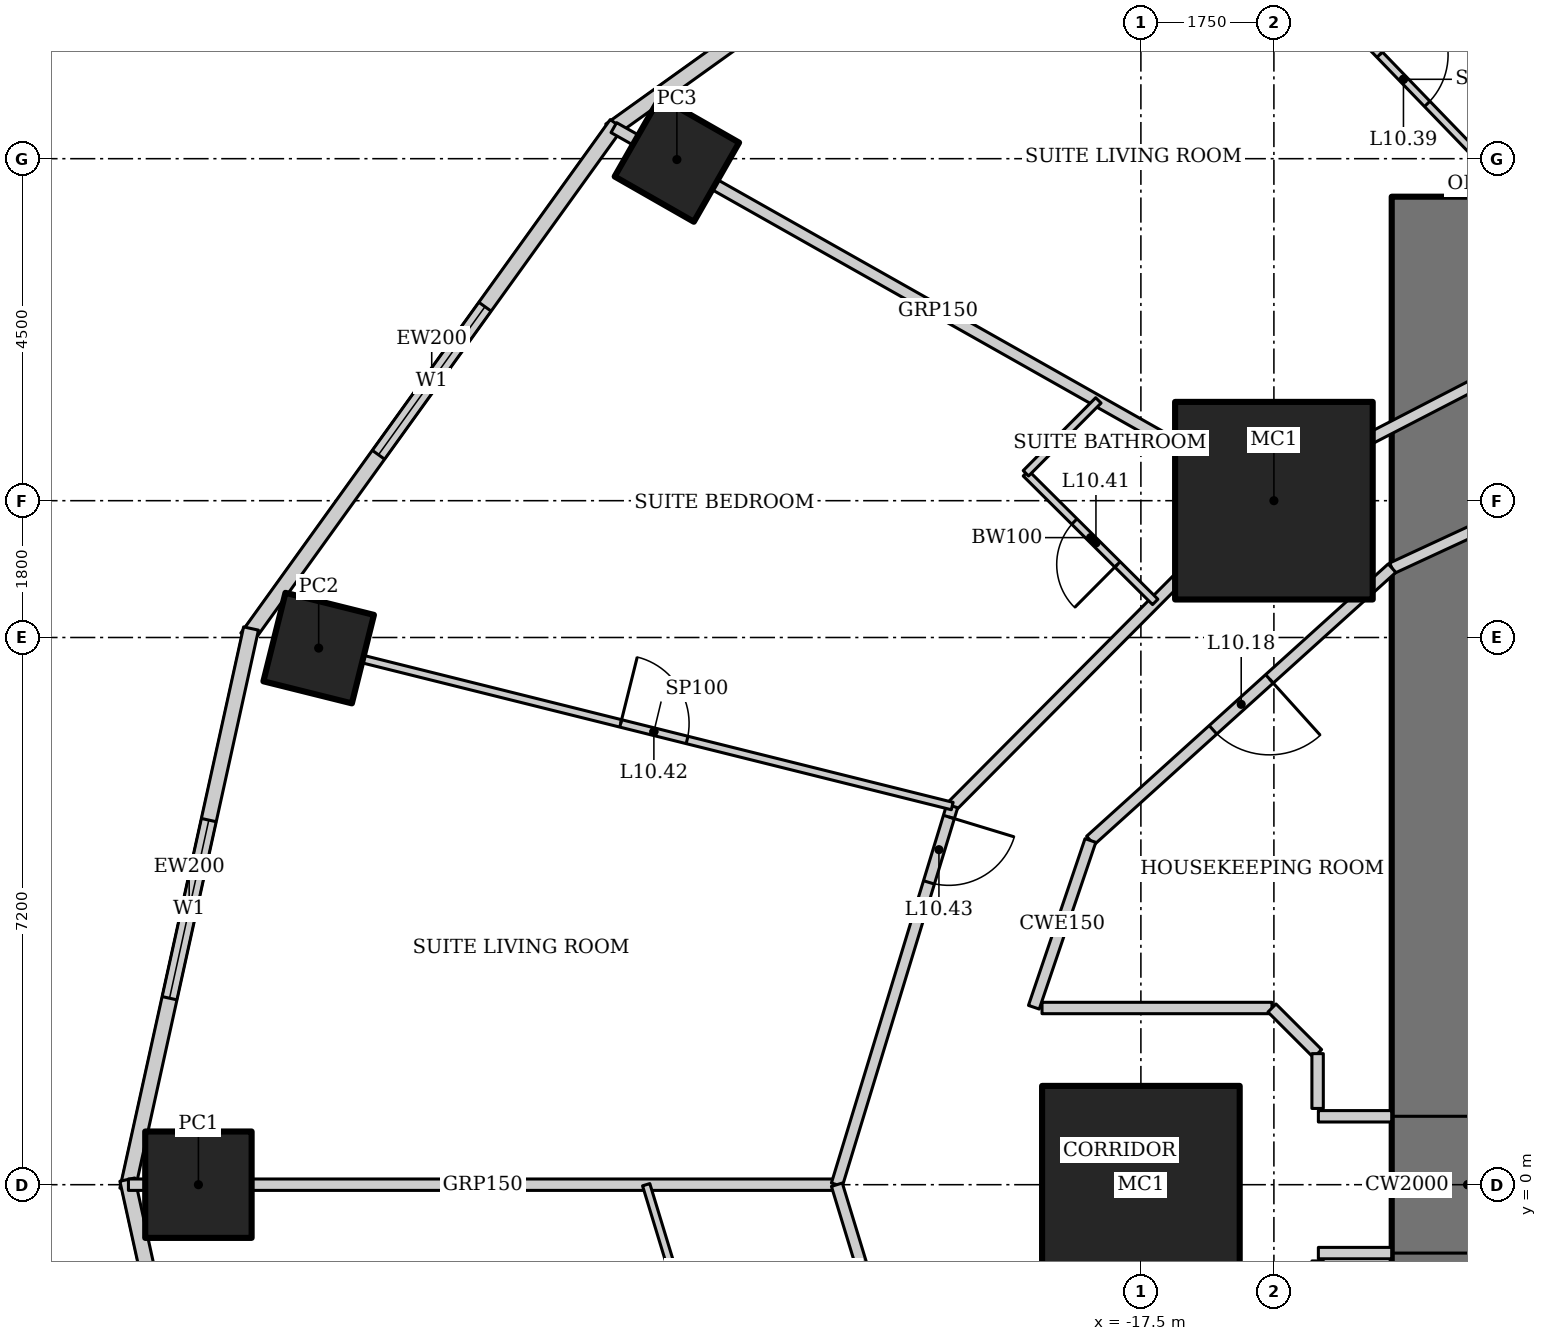
"""IFC4 building model, lengths in metres.
Left out: names, types, materials, properties, quantities, classifications, styles, units other than length and angle.
Written with IfcOpenShell. Run it as: python <this file> out.ifc"""

import sys

from ifc_helpers import new_model, si_unit, direction, frame, frame_2d, origin, origin_2d, place, context, subcontext, project, spatial, rectangle, hollow_rectangle, extrude, element, fill, save


model = new_model("IFC4")
c1 = context("Model", 3, precision=1e-05, world=origin(), true_north=direction((0.0, 1.0)))
c2 = subcontext(c1, "Body", "Model", "MODEL_VIEW")
j1 = project(units=[si_unit("LENGTHUNIT", "METRE"), si_unit("PLANEANGLEUNIT", "RADIAN")], contexts=[c1])
p1 = place(None, origin())
s1 = spatial("IfcSite", under=j1, at=p1, CompositionType="ELEMENT")
p2 = place(p1, origin())
s2 = spatial("IfcBuilding", under=s1, at=p2, CompositionType="ELEMENT")
p3 = place(p2, frame((0.0, 0.0, 51.4)))
s3 = spatial("IfcBuildingStorey", under=s2, at=p3, CompositionType="ELEMENT", Elevation=51.4)
for number, where, z_axis, x_axis in (
    (1, (-15.75, 9.0, 0.0), (0.0, 0.0, 1.0), (1.0, 0.0, 0.0)),
    (2, (-17.5, 0.0, 0.0), (0.0, 0.0, 1.0), (1.0, 0.0, 0.0)),
):
    element("IfcColumn", number, at=place(p3, frame(where, z_axis=z_axis, x_axis=x_axis)), inside=s3, PredefinedType="COLUMN", context=c2, shape_type="SweptSolid", body=[
        extrude(hollow_rectangle(XDim=2.6, YDim=2.6, WallThickness=0.13, at=origin_2d()), origin(), (0.0, 0.0, 1.0), 3.6),
    ])
p4 = place(p3, frame((-23.605, 13.489, 0.0), z_axis=(0.0, 0.0, 1.0), x_axis=(0.496139221777, 0.86824298017, 0.0)))
e3 = element("IfcColumn", 3, at=p4, inside=s3, PredefinedType="COLUMN", context=c2, shape_type="SweptSolid", body=[
    extrude(hollow_rectangle(XDim=1.2, YDim=1.2, WallThickness=0.12, at=origin_2d()), origin(), (0.0, 0.0, 1.0), 3.6),
])
p5 = place(p3, frame((-28.318, 7.06, 0.0), z_axis=(0.0, 0.0, 1.0), x_axis=(0.2419218956, 0.970295726276, 0.0)))
e4 = element("IfcColumn", 4, at=p5, inside=s3, PredefinedType="COLUMN", context=c2, shape_type="SweptSolid", body=[
    extrude(hollow_rectangle(XDim=1.2, YDim=1.2, WallThickness=0.1, at=origin_2d()), origin(), (0.0, 0.0, 1.0), 3.6),
])
p6 = place(p3, frame((-29.9, 0.0, 0.0), z_axis=(0.0, 0.0, 1.0), x_axis=(1.0, 0.0, 0.0)))
e5 = element("IfcColumn", 5, at=p6, inside=s3, PredefinedType="COLUMN", context=c2, shape_type="SweptSolid", body=[
    extrude(hollow_rectangle(XDim=1.4, YDim=1.4, WallThickness=0.1, at=origin_2d()), origin(), (0.0, 0.0, 1.0), 3.6),
])
p7 = place(p3, frame((-13.2, 13.0, 0.0), z_axis=(0.0, 0.0, 1.0), x_axis=(0.0, -1.0, 0.0)))
e6 = element("IfcWall", 6, at=p7, inside=s3, PredefinedType="SHEAR", context=c2, shape_type="SweptSolid", body=[
    extrude(rectangle(XDim=26.0, YDim=2.0, at=frame_2d((13.0, 0.0))), origin(), (0.0, 0.0, 1.0), 3.6),
])
p8 = place(p7, frame((12.1, 0.0, 0.0)))
e7 = element("IfcOpeningElement", 7, at=p8, cuts=e6, PredefinedType="OPENING", context=c2, shape_type="SweptSolid", body=[
    extrude(rectangle(XDim=1.8, YDim=2.1, at=frame_2d((0.9, 1.05))), frame((0.0, 1.01, 0.0), z_axis=(0.0, -1.0, 0.0), x_axis=(1.0, 0.0, 0.0)), (0.0, 0.0, 1.0), 2.02),
])
p9 = place(p3, frame((-17.929, 18.572, 0.0), z_axis=(0.0, 0.0, 1.0), x_axis=(-0.812791321576, -0.582554948112, 0.0)))
e8 = element("IfcWall", 8, at=p9, inside=s3, PredefinedType="SOLIDWALL", context=c2, shape_type="SweptSolid", body=[
    extrude(rectangle(XDim=8.063, YDim=0.2, at=frame_2d((4.032, 0.0))), origin(), (0.0, 0.0, 1.0), 3.45),
])
p10 = place(p9, frame((2.832, 0.0, 0.5)))
e9 = element("IfcOpeningElement", 9, at=p10, cuts=e8, PredefinedType="OPENING", context=c2, shape_type="SweptSolid", body=[
    extrude(rectangle(XDim=2.4, YDim=2.2, at=frame_2d((1.2, 1.1))), frame((0.0, 0.11, 0.0), z_axis=(0.0, -1.0, 0.0), x_axis=(1.0, 0.0, 0.0)), (0.0, 0.0, 1.0), 0.22),
])
p11 = place(p3, frame((-24.4, 13.957, 0.0), z_axis=(0.0, 0.0, 1.0), x_axis=(-0.583937613703, -0.811798536155, 0.0)))
e10 = element("IfcWall", 10, at=p11, inside=s3, PredefinedType="SOLIDWALL", context=c2, shape_type="SweptSolid", body=[
    extrude(rectangle(XDim=8.323, YDim=0.2, at=frame_2d((4.162, 0.0))), origin(), (0.0, 0.0, 1.0), 3.45),
])
p12 = place(p11, frame((2.961, 0.0, 0.5)))
e11 = element("IfcOpeningElement", 11, at=p12, cuts=e10, PredefinedType="OPENING", context=c2, shape_type="SweptSolid", body=[
    extrude(rectangle(XDim=2.4, YDim=2.2, at=frame_2d((1.2, 1.1))), frame((0.0, 0.11, 0.0), z_axis=(0.0, -1.0, 0.0), x_axis=(1.0, 0.0, 0.0)), (0.0, 0.0, 1.0), 0.22),
])
p13 = place(p3, frame((-29.208, 7.318, 0.0), z_axis=(0.0, 0.0, 1.0), x_axis=(-0.215238065514, -0.976561608478, 0.0)))
e12 = element("IfcWall", 12, at=p13, inside=s3, PredefinedType="SOLIDWALL", context=c2, shape_type="SweptSolid", body=[
    extrude(rectangle(XDim=7.562, YDim=0.2, at=frame_2d((3.781, 0.0))), origin(), (0.0, 0.0, 1.0), 3.45),
])
p14 = place(p13, frame((2.581, 0.0, 0.5)))
e13 = element("IfcOpeningElement", 13, at=p14, cuts=e12, PredefinedType="OPENING", context=c2, shape_type="SweptSolid", body=[
    extrude(rectangle(XDim=2.4, YDim=2.2, at=frame_2d((1.2, 1.1))), frame((0.0, 0.11, 0.0), z_axis=(0.0, -1.0, 0.0), x_axis=(1.0, 0.0, 0.0)), (0.0, 0.0, 1.0), 0.22),
])
p15 = place(p3, frame((-30.835, 0.067, 0.0), z_axis=(0.0, 0.0, 1.0), x_axis=(0.215238065514, -0.976561608478, 0.0)))
e14 = element("IfcWall", 14, at=p15, inside=s3, PredefinedType="SOLIDWALL", context=c2, shape_type="SweptSolid", body=[
    extrude(rectangle(XDim=7.562, YDim=0.2, at=frame_2d((3.781, 0.0))), origin(), (0.0, 0.0, 1.0), 3.45),
])
p16 = place(p15, frame((2.581, 0.0, 0.5)))
e15 = element("IfcOpeningElement", 15, at=p16, cuts=e14, PredefinedType="OPENING", context=c2, shape_type="SweptSolid", body=[
    extrude(rectangle(XDim=2.4, YDim=2.2, at=frame_2d((1.2, 1.1))), frame((0.0, 0.11, 0.0), z_axis=(0.0, -1.0, 0.0), x_axis=(1.0, 0.0, 0.0)), (0.0, 0.0, 1.0), 0.22),
])
p17 = place(p3, frame((-24.435, 13.909, 0.0), z_axis=(0.0, 0.0, 1.0), x_axis=(0.870612006791, -0.491970256856, 0.0)))
e16 = element("IfcWall", 16, at=p17, inside=s3, PredefinedType="PARTITIONING", context=c2, shape_type="SweptSolid", body=[
    extrude(rectangle(XDim=9.802, YDim=0.15, at=frame_2d((4.901, 0.0))), origin(), (0.0, 0.0, 1.0), 2.693),
])
p18 = place(p3, frame((-30.821, 0.0, 0.0), z_axis=(0.0, 0.0, 1.0), x_axis=(1.0, 0.0, 0.0)))
e17 = element("IfcWall", 17, at=p18, inside=s3, PredefinedType="PARTITIONING", context=c2, shape_type="SweptSolid", body=[
    extrude(rectangle(XDim=9.321, YDim=0.15, at=frame_2d((4.66, 0.0))), origin(), (0.0, 0.0, 1.0), 2.528),
])
p19 = place(p3, frame((-11.147, 11.544, 0.0), z_axis=(0.0, 0.0, 1.0), x_axis=(-0.888333171507, -0.459199495209, 0.0)))
e18 = element("IfcWall", 18, at=p19, inside=s3, PredefinedType="PARTITIONING", context=c2, shape_type="SweptSolid", body=[
    extrude(rectangle(XDim=5.351, YDim=0.15, at=frame_2d((2.676, 0.0))), origin(), (0.0, 0.0, 1.0), 3.45),
])
p20 = place(p19, frame((0.15, 0.0, 0.0)))
e19 = element("IfcOpeningElement", 19, at=p20, cuts=e18, PredefinedType="OPENING", context=c2, shape_type="SweptSolid", body=[
    extrude(rectangle(XDim=0.9, YDim=2.1, at=frame_2d((0.45, 1.05))), frame((0.0, 0.085, 0.0), z_axis=(0.0, -1.0, 0.0), x_axis=(1.0, 0.0, 0.0)), (0.0, 0.0, 1.0), 0.17),
])
p21 = place(p3, frame((-15.901, 9.086, 0.0), z_axis=(0.0, 0.0, 1.0), x_axis=(-0.705121546414, -0.709086457904, 0.0)))
e20 = element("IfcWall", 20, at=p21, inside=s3, PredefinedType="PARTITIONING", context=c2, shape_type="SweptSolid", body=[
    extrude(rectangle(XDim=5.788, YDim=0.15, at=frame_2d((2.894, 0.0))), origin(), (0.0, 0.0, 1.0), 3.45),
])
p22 = place(p3, frame((-19.982, 4.982, 0.0), z_axis=(0.0, 0.0, 1.0), x_axis=(-0.291383581394, -0.95660629754, 0.0)))
e21 = element("IfcWall", 21, at=p22, inside=s3, PredefinedType="PARTITIONING", context=c2, shape_type="SweptSolid", body=[
    extrude(rectangle(XDim=5.208, YDim=0.15, at=frame_2d((2.604, 0.0))), origin(), (0.0, 0.0, 1.0), 3.45),
])
p23 = place(p22, frame((0.15, 0.0, 0.0)))
e22 = element("IfcOpeningElement", 22, at=p23, cuts=e21, PredefinedType="OPENING", context=c2, shape_type="SweptSolid", body=[
    extrude(rectangle(XDim=0.9, YDim=2.1, at=frame_2d((0.45, 1.05))), frame((0.0, 0.085, 0.0), z_axis=(0.0, -1.0, 0.0), x_axis=(1.0, 0.0, 0.0)), (0.0, 0.0, 1.0), 0.17),
])
p24 = place(p3, frame((-21.5, 0.0, 0.0), z_axis=(0.0, 0.0, 1.0), x_axis=(0.291383581394, -0.95660629754, 0.0)))
e23 = element("IfcWall", 23, at=p24, inside=s3, PredefinedType="PARTITIONING", context=c2, shape_type="SweptSolid", body=[
    extrude(rectangle(XDim=5.208, YDim=0.15, at=frame_2d((2.604, 0.0))), origin(), (0.0, 0.0, 1.0), 3.45),
])
p25 = place(p3, frame((-9.801, 10.149, 0.0), z_axis=(0.0, 0.0, 1.0), x_axis=(-0.907279653965, -0.420527798727, 0.0)))
e24 = element("IfcWall", 24, at=p25, inside=s3, PredefinedType="PARTITIONING", context=c2, shape_type="SweptSolid", body=[
    extrude(rectangle(XDim=4.844, YDim=0.15, at=frame_2d((2.422, 0.0))), origin(), (0.0, 0.0, 1.0), 3.45),
])
p26 = place(p3, frame((-14.196, 8.112, 0.0), z_axis=(0.0, 0.0, 1.0), x_axis=(-0.742194222, -0.670184852731, 0.0)))
e25 = element("IfcWall", 25, at=p26, inside=s3, PredefinedType="PARTITIONING", context=c2, shape_type="SweptSolid", body=[
    extrude(rectangle(XDim=5.347, YDim=0.15, at=frame_2d((2.673, 0.0))), origin(), (0.0, 0.0, 1.0), 3.45),
])
p27 = place(p26, frame((2.173, 0.0, 0.0)))
e26 = element("IfcOpeningElement", 26, at=p27, cuts=e25, PredefinedType="OPENING", context=c2, shape_type="SweptSolid", body=[
    extrude(rectangle(XDim=1.0, YDim=2.1, at=frame_2d((0.5, 1.05))), frame((0.0, 0.085, 0.0), z_axis=(0.0, -1.0, 0.0), x_axis=(1.0, 0.0, 0.0)), (0.0, 0.0, 1.0), 0.17),
])
p28 = place(p3, frame((-16.944, 17.545, 0.0), z_axis=(0.0, 0.0, 1.0), x_axis=(0.694680670522, -0.71931826475, 0.0)))
e27 = element("IfcWall", 27, at=p28, inside=s3, PredefinedType="PARTITIONING", context=c2, shape_type="SweptSolid", body=[
    extrude(rectangle(XDim=8.344, YDim=0.1, at=frame_2d((4.172, 0.0))), origin(), (0.0, 0.0, 1.0), 2.528),
])
p29 = place(p28, frame((3.722, 0.0, 0.0)))
e28 = element("IfcOpeningElement", 28, at=p29, cuts=e27, PredefinedType="OPENING", context=c2, shape_type="SweptSolid", body=[
    extrude(rectangle(XDim=0.9, YDim=2.1, at=frame_2d((0.45, 1.05))), frame((0.0, 0.06, 0.0), z_axis=(0.0, -1.0, 0.0), x_axis=(1.0, 0.0, 0.0)), (0.0, 0.0, 1.0), 0.12),
])
p30 = place(p3, frame((-17.311, 7.668, 0.0), z_axis=(0.0, 0.0, 1.0), x_axis=(-0.709138392716, 0.705069315724, 0.0)))
e29 = element("IfcWall", 29, at=p30, inside=s3, PredefinedType="PARTITIONING", context=c2, shape_type="SweptSolid", body=[
    extrude(rectangle(XDim=2.4, YDim=0.1, at=frame_2d((1.2, 0.0))), origin(), (0.0, 0.0, 1.0), 3.45),
])
p31 = place(p30, frame((0.7, 0.0, 0.0)))
e30 = element("IfcOpeningElement", 30, at=p31, cuts=e29, PredefinedType="OPENING", context=c2, shape_type="SweptSolid", body=[
    extrude(rectangle(XDim=0.8, YDim=2.1, at=frame_2d((0.4, 1.05))), frame((0.0, 0.06, 0.0), z_axis=(0.0, -1.0, 0.0), x_axis=(1.0, 0.0, 0.0)), (0.0, 0.0, 1.0), 0.12),
])
p32 = place(p3, frame((-19.013, 9.36, 0.0), z_axis=(0.0, 0.0, 1.0), x_axis=(0.7051187611, 0.709089227633, 0.0)))
e31 = element("IfcWall", 31, at=p32, inside=s3, PredefinedType="PARTITIONING", context=c2, shape_type="SweptSolid", body=[
    extrude(rectangle(XDim=1.353, YDim=0.1, at=frame_2d((0.676, 0.0))), origin(), (0.0, 0.0, 1.0), 3.45),
])
p33 = place(p3, frame((-27.833, 6.939, 0.0), z_axis=(0.0, 0.0, 1.0), x_axis=(0.97029673161, -0.24191786339, 0.0)))
e32 = element("IfcWall", 32, at=p33, inside=s3, PredefinedType="PARTITIONING", context=c2, shape_type="SweptSolid", body=[
    extrude(rectangle(XDim=8.091, YDim=0.1, at=frame_2d((4.045, 0.0))), origin(), (0.0, 0.0, 1.0), 2.333),
])
p34 = place(p33, frame((3.595, 0.0, 0.0)))
e33 = element("IfcOpeningElement", 33, at=p34, cuts=e32, PredefinedType="OPENING", context=c2, shape_type="SweptSolid", body=[
    extrude(rectangle(XDim=0.9, YDim=2.1, at=frame_2d((0.45, 1.05))), frame((0.0, 0.06, 0.0), z_axis=(0.0, -1.0, 0.0), x_axis=(1.0, 0.0, 0.0)), (0.0, 0.0, 1.0), 0.12),
])
p35 = place(p3, frame((-23.213, -2.613, 0.0), z_axis=(0.0, 0.0, 1.0), x_axis=(-0.291339473488, 0.956619731757, 0.0)))
e34 = element("IfcWall", 34, at=p35, inside=s3, PredefinedType="PARTITIONING", context=c2, shape_type="SweptSolid", body=[
    extrude(rectangle(XDim=2.731, YDim=0.1, at=frame_2d((1.365, 0.0))), origin(), (0.0, 0.0, 1.0), 3.45),
])
p36 = place(p3, frame((-13.2, 13.0, 0.0), z_axis=(0.0, 0.0, 1.0), x_axis=(0.719347134512, 0.69465077562, 0.0)))
e35 = element("IfcWall", 35, at=p36, inside=s3, PredefinedType="PARTITIONING", context=c2, shape_type="SweptSolid", body=[
    extrude(rectangle(XDim=0.465, YDim=0.1, at=frame_2d((0.232, 0.0))), origin(), (0.0, 0.0, 1.0), 3.45),
])
p37 = place(p3, frame((-18.164, 4.529, 0.0), z_axis=(0.0, 0.0, 1.0), x_axis=(-0.321124194945, -0.947037090837, 0.0)))
e36 = element("IfcWall", 36, at=p37, inside=s3, PredefinedType="PARTITIONING", context=c2, shape_type="SweptSolid", body=[
    extrude(rectangle(XDim=2.317, YDim=0.15, at=frame_2d((1.158, 0.0))), origin(), (0.0, 0.0, 1.0), 3.45),
])
for number, where, z_axis, x_axis in (
    (37, (-14.2, -0.9, 0.0), (0.0, 0.0, 1.0), (-1.0, 0.0, 0.0)),
    (38, (-14.2, 0.9, 0.0), (0.0, 0.0, 1.0), (-1.0, 0.0, 0.0)),
):
    element("IfcWall", number, at=place(p3, frame(where, z_axis=z_axis, x_axis=x_axis)), inside=s3, PredefinedType="PARTITIONING", context=c2, shape_type="SweptSolid", body=[
        extrude(rectangle(XDim=0.965, YDim=0.15, at=frame_2d((0.482, 0.0))), origin(), (0.0, 0.0, 1.0), 3.45),
    ])
p38 = place(p3, frame((-18.801, 2.325, 0.0), z_axis=(0.0, 0.0, 1.0), x_axis=(1.0, 0.0, 0.0)))
e39 = element("IfcWall", 39, at=p38, inside=s3, PredefinedType="PARTITIONING", context=c2, shape_type="SweptSolid", body=[
    extrude(rectangle(XDim=3.025, YDim=0.15, at=frame_2d((1.513, 0.0))), origin(), (0.0, 0.0, 1.0), 3.45),
])
p39 = place(p3, frame((-15.775, 2.325, 0.0), z_axis=(0.0, 0.0, 1.0), x_axis=(0.707106781187, -0.707106781187, 0.0)))
e40 = element("IfcWall", 40, at=p39, inside=s3, PredefinedType="PARTITIONING", context=c2, shape_type="SweptSolid", body=[
    extrude(rectangle(XDim=0.849, YDim=0.15, at=frame_2d((0.425, 0.0))), origin(), (0.0, 0.0, 1.0), 3.45),
])
p40 = place(p3, frame((-15.175, 1.725, 0.0), z_axis=(0.0, 0.0, 1.0), x_axis=(0.0, -1.0, 0.0)))
e41 = element("IfcWall", 41, at=p40, inside=s3, PredefinedType="PARTITIONING", context=c2, shape_type="SweptSolid", body=[
    extrude(rectangle(XDim=0.721, YDim=0.15, at=frame_2d((0.361, 0.0))), origin(), (0.0, 0.0, 1.0), 3.45),
])
p41 = place(p12, origin())
e42 = element("IfcWindow", 42, at=p41, inside=s3, PartitioningType="SINGLE_PANEL", PredefinedType="WINDOW", context=c2, shape_type="SweptSolid", body=[
    extrude(rectangle(XDim=2.4, YDim=2.2, at=frame_2d((1.2, 1.1))), frame((0.0, 0.03, 0.0), z_axis=(0.0, -1.0, 0.0), x_axis=(1.0, 0.0, 0.0)), (0.0, 0.0, 1.0), 0.06),
])
fill(e11, e42)
p42 = place(p14, origin())
e43 = element("IfcWindow", 43, at=p42, inside=s3, PartitioningType="SINGLE_PANEL", PredefinedType="WINDOW", context=c2, shape_type="SweptSolid", body=[
    extrude(rectangle(XDim=2.4, YDim=2.2, at=frame_2d((1.2, 1.1))), frame((0.0, 0.03, 0.0), z_axis=(0.0, -1.0, 0.0), x_axis=(1.0, 0.0, 0.0)), (0.0, 0.0, 1.0), 0.06),
])
fill(e13, e43)
p43 = place(p8, origin())
e44 = element("IfcDoor", 44, at=p43, inside=s3, OperationType="DOUBLE_DOOR_DOUBLE_SWING", PredefinedType="DOOR", context=c2, shape_type="SweptSolid", body=[
    extrude(rectangle(XDim=1.8, YDim=2.1, at=frame_2d((0.9, 1.05))), frame((0.0, 0.025, 0.0), z_axis=(0.0, -1.0, 0.0), x_axis=(1.0, 0.0, 0.0)), (0.0, 0.0, 1.0), 0.05),
])
fill(e7, e44)
p44 = place(p27, origin())
e45 = element("IfcDoor", 45, at=p44, inside=s3, OperationType="SINGLE_SWING_LEFT", PredefinedType="DOOR", context=c2, shape_type="SweptSolid", body=[
    extrude(rectangle(XDim=1.0, YDim=2.1, at=frame_2d((0.5, 1.05))), frame((0.0, 0.025, 0.0), z_axis=(0.0, -1.0, 0.0), x_axis=(1.0, 0.0, 0.0)), (0.0, 0.0, 1.0), 0.05),
])
fill(e26, e45)
p45 = place(p29, origin())
e46 = element("IfcDoor", 46, at=p45, inside=s3, OperationType="SINGLE_SWING_LEFT", PredefinedType="DOOR", context=c2, shape_type="SweptSolid", body=[
    extrude(rectangle(XDim=0.9, YDim=2.1, at=frame_2d((0.45, 1.05))), frame((0.0, 0.025, 0.0), z_axis=(0.0, -1.0, 0.0), x_axis=(1.0, 0.0, 0.0)), (0.0, 0.0, 1.0), 0.05),
])
fill(e28, e46)
p46 = place(p31, origin())
e47 = element("IfcDoor", 47, at=p46, inside=s3, OperationType="SINGLE_SWING_LEFT", PredefinedType="DOOR", context=c2, shape_type="SweptSolid", body=[
    extrude(rectangle(XDim=0.8, YDim=2.1, at=frame_2d((0.4, 1.05))), frame((0.0, 0.025, 0.0), z_axis=(0.0, -1.0, 0.0), x_axis=(1.0, 0.0, 0.0)), (0.0, 0.0, 1.0), 0.05),
])
fill(e30, e47)
p47 = place(p34, origin())
e48 = element("IfcDoor", 48, at=p47, inside=s3, OperationType="SINGLE_SWING_LEFT", PredefinedType="DOOR", context=c2, shape_type="SweptSolid", body=[
    extrude(rectangle(XDim=0.9, YDim=2.1, at=frame_2d((0.45, 1.05))), frame((0.0, 0.025, 0.0), z_axis=(0.0, -1.0, 0.0), x_axis=(1.0, 0.0, 0.0)), (0.0, 0.0, 1.0), 0.05),
])
fill(e33, e48)
p48 = place(p23, origin())
e49 = element("IfcDoor", 49, at=p48, inside=s3, OperationType="SINGLE_SWING_LEFT", PredefinedType="DOOR", context=c2, shape_type="SweptSolid", body=[
    extrude(rectangle(XDim=0.9, YDim=2.1, at=frame_2d((0.45, 1.05))), frame((0.0, 0.025, 0.0), z_axis=(0.0, -1.0, 0.0), x_axis=(1.0, 0.0, 0.0)), (0.0, 0.0, 1.0), 0.05),
])
fill(e22, e49)
save(model, sys.argv[1])
